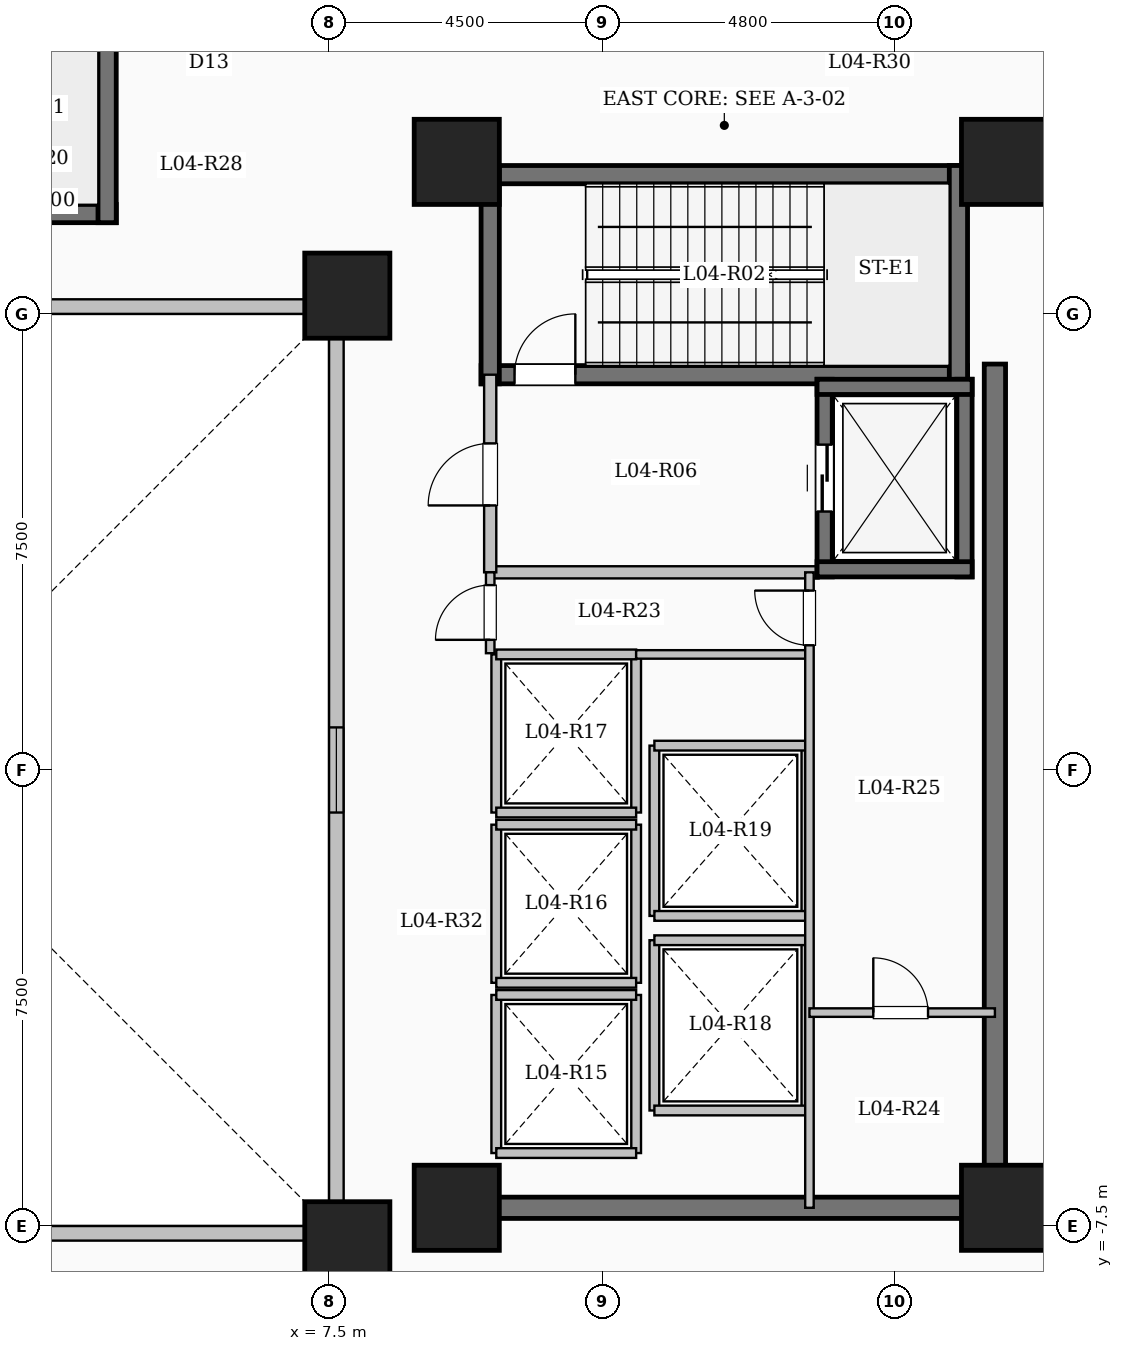
"""IFC4 building model, lengths in metres.
Left out: names, types, materials, properties, quantities, classifications, styles, units other than length and angle.
Written with IfcOpenShell. Run it as: python <this file> out.ifc"""

import sys

from ifc_helpers import new_model, si_unit, direction, frame, frame_2d, origin, origin_2d, place, context, subcontext, project, spatial, rectangle, extrude, element, fill, save


model = new_model("IFC4")
c1 = context("Model", 3, precision=1e-05, world=origin(), true_north=direction((0.0, 1.0)))
c2 = subcontext(c1, "Body", "Model", "MODEL_VIEW")
j1 = project(units=[si_unit("LENGTHUNIT", "METRE"), si_unit("PLANEANGLEUNIT", "RADIAN")], contexts=[c1])
p1 = place(None, origin())
s1 = spatial("IfcSite", under=j1, at=p1, CompositionType="ELEMENT")
p2 = place(p1, origin())
s2 = spatial("IfcBuilding", under=s1, at=p2, CompositionType="ELEMENT")
p3 = place(p2, frame((0.0, 0.0, 18.9)))
s3 = spatial("IfcBuildingStorey", under=s2, at=p3, CompositionType="ELEMENT", Elevation=18.9)
for number, where, z_axis, x_axis in (
    (1, (7.8, -7.8, 0.0), (0.0, 0.0, 1.0), (1.0, 0.0, 0.0)),
    (2, (7.8, 7.8, 0.0), (0.0, 0.0, 1.0), (1.0, 0.0, 0.0)),
    (3, (9.6, -7.2, 0.0), (0.0, 0.0, 1.0), (1.0, 0.0, 0.0)),
    (4, (9.6, 10.0, 0.0), (0.0, 0.0, 1.0), (1.0, 0.0, 0.0)),
    (5, (18.6, -7.2, 0.0), (0.0, 0.0, 1.0), (1.0, 0.0, 0.0)),
    (6, (18.6, 10.0, 0.0), (0.0, 0.0, 1.0), (1.0, 0.0, 0.0)),
):
    element("IfcColumn", number, at=place(p3, frame(where, z_axis=z_axis, x_axis=x_axis)), inside=s3, PredefinedType="COLUMN", context=c2, shape_type="SweptSolid", body=[
        extrude(rectangle(XDim=1.4, YDim=1.4, at=origin_2d()), origin(), (0.0, 0.0, 1.0), 5.1),
    ])
p4 = place(p3, frame((-7.62, -7.62, 0.0), z_axis=(0.0, 0.0, 1.0), x_axis=(1.0, 0.0, 0.0)))
e7 = element("IfcWall", 7, at=p4, inside=s3, PredefinedType="SOLIDWALL", context=c2, shape_type="SweptSolid", body=[
    extrude(rectangle(XDim=15.24, YDim=0.24, at=frame_2d((7.62, 0.0))), origin(), (0.0, 0.0, 1.0), 4.85),
])
p5 = place(p4, frame((6.92, 0.0, 0.95)))
e8 = element("IfcOpeningElement", 8, at=p5, cuts=e7, PredefinedType="OPENING", context=c2, shape_type="SweptSolid", body=[
    extrude(rectangle(XDim=1.4, YDim=1.5, at=frame_2d((0.7, 0.75))), frame((0.0, 0.13, 0.0), z_axis=(0.0, -1.0, 0.0), x_axis=(1.0, 0.0, 0.0)), (0.0, 0.0, 1.0), 0.26),
])
p6 = place(p3, frame((7.62, -7.62, 0.0), z_axis=(0.0, 0.0, 1.0), x_axis=(0.0, 1.0, 0.0)))
e9 = element("IfcWall", 9, at=p6, inside=s3, PredefinedType="SOLIDWALL", context=c2, shape_type="SweptSolid", body=[
    extrude(rectangle(XDim=15.24, YDim=0.24, at=frame_2d((7.62, 0.0))), origin(), (0.0, 0.0, 1.0), 4.85),
])
p7 = place(p6, frame((6.92, 0.0, 0.95)))
e10 = element("IfcOpeningElement", 10, at=p7, cuts=e9, PredefinedType="OPENING", context=c2, shape_type="SweptSolid", body=[
    extrude(rectangle(XDim=1.4, YDim=1.5, at=frame_2d((0.7, 0.75))), frame((0.0, 0.13, 0.0), z_axis=(0.0, -1.0, 0.0), x_axis=(1.0, 0.0, 0.0)), (0.0, 0.0, 1.0), 0.26),
])
p8 = place(p3, frame((7.62, 7.62, 0.0), z_axis=(0.0, 0.0, 1.0), x_axis=(-1.0, 0.0, 0.0)))
e11 = element("IfcWall", 11, at=p8, inside=s3, PredefinedType="SOLIDWALL", context=c2, shape_type="SweptSolid", body=[
    extrude(rectangle(XDim=15.24, YDim=0.24, at=frame_2d((7.62, 0.0))), origin(), (0.0, 0.0, 1.0), 4.85),
])
p9 = place(p8, frame((6.92, 0.0, 0.95)))
e12 = element("IfcOpeningElement", 12, at=p9, cuts=e11, PredefinedType="OPENING", context=c2, shape_type="SweptSolid", body=[
    extrude(rectangle(XDim=1.4, YDim=1.5, at=frame_2d((0.7, 0.75))), frame((0.0, 0.13, 0.0), z_axis=(0.0, -1.0, 0.0), x_axis=(1.0, 0.0, 0.0)), (0.0, 0.0, 1.0), 0.26),
])
p10 = place(p3, frame((10.0, 9.79, 0.0), z_axis=(0.0, 0.0, 1.0), x_axis=(1.0, 0.0, 0.0)))
e13 = element("IfcWall", 13, at=p10, inside=s3, PredefinedType="SHEAR", context=c2, shape_type="SweptSolid", body=[
    extrude(rectangle(XDim=8.0, YDim=0.3, at=frame_2d((4.0, 0.0))), origin(), (0.0, 0.0, 1.0), 5.1),
])
p11 = place(p3, frame((10.0, 6.5, 0.0), z_axis=(0.0, 0.0, 1.0), x_axis=(1.0, 0.0, 0.0)))
e14 = element("IfcWall", 14, at=p11, inside=s3, PredefinedType="SHEAR", context=c2, shape_type="SweptSolid", body=[
    extrude(rectangle(XDim=8.0, YDim=0.3, at=frame_2d((4.0, 0.0))), origin(), (0.0, 0.0, 1.0), 5.1),
])
p12 = place(p11, frame((0.55, 0.0, 0.0)))
e15 = element("IfcOpeningElement", 15, at=p12, cuts=e14, PredefinedType="OPENING", context=c2, shape_type="SweptSolid", body=[
    extrude(rectangle(XDim=1.0, YDim=2.15, at=frame_2d((0.5, 1.075))), frame((0.0, 0.16, 0.0), z_axis=(0.0, -1.0, 0.0), x_axis=(1.0, 0.0, 0.0)), (0.0, 0.0, 1.0), 0.32),
])
for number, where, z_axis, x_axis in (
    (16, (10.15, 6.35, 0.0), (0.0, 0.0, 1.0), (0.0, 1.0, 0.0)),
    (17, (17.85, 6.35, 0.0), (0.0, 0.0, 1.0), (0.0, 1.0, 0.0)),
):
    element("IfcWall", number, at=place(p3, frame(where, z_axis=z_axis, x_axis=x_axis)), inside=s3, PredefinedType="SHEAR", context=c2, shape_type="SweptSolid", body=[
        extrude(rectangle(XDim=3.59, YDim=0.3, at=frame_2d((1.795, 0.0))), origin(), (0.0, 0.0, 1.0), 5.1),
    ])
p13 = place(p3, frame((-4.0, 9.15, 0.0), z_axis=(0.0, 0.0, 1.0), x_axis=(1.0, 0.0, 0.0)))
e18 = element("IfcWall", 18, at=p13, inside=s3, PredefinedType="SHEAR", context=c2, shape_type="SweptSolid", body=[
    extrude(rectangle(XDim=8.0, YDim=0.3, at=frame_2d((4.0, 0.0))), origin(), (0.0, 0.0, 1.0), 5.1),
])
p14 = place(p13, frame((0.55, 0.0, 0.0)))
e19 = element("IfcOpeningElement", 19, at=p14, cuts=e18, PredefinedType="OPENING", context=c2, shape_type="SweptSolid", body=[
    extrude(rectangle(XDim=1.0, YDim=2.15, at=frame_2d((0.5, 1.075))), frame((0.0, 0.16, 0.0), z_axis=(0.0, -1.0, 0.0), x_axis=(1.0, 0.0, 0.0)), (0.0, 0.0, 1.0), 0.32),
])
p15 = place(p3, frame((3.85, 9.0, 0.0), z_axis=(0.0, 0.0, 1.0), x_axis=(0.0, 1.0, 0.0)))
e20 = element("IfcWall", 20, at=p15, inside=s3, PredefinedType="SHEAR", context=c2, shape_type="SweptSolid", body=[
    extrude(rectangle(XDim=3.59, YDim=0.3, at=frame_2d((1.795, 0.0))), origin(), (0.0, 0.0, 1.0), 5.1),
])
p16 = place(p3, frame((10.15, 3.25, 0.0), z_axis=(0.0, 0.0, 1.0), x_axis=(1.0, 0.0, 0.0)))
e21 = element("IfcWall", 21, at=p16, inside=s3, PredefinedType="SOLIDWALL", context=c2, shape_type="SweptSolid", body=[
    extrude(rectangle(XDim=5.4, YDim=0.2, at=frame_2d((2.7, 0.0))), origin(), (0.0, 0.0, 1.0), 4.85),
])
p17 = place(p3, frame((10.15, 3.25, 0.0), z_axis=(0.0, 0.0, 1.0), x_axis=(0.0, 1.0, 0.0)))
e22 = element("IfcWall", 22, at=p17, inside=s3, PredefinedType="SOLIDWALL", context=c2, shape_type="SweptSolid", body=[
    extrude(rectangle(XDim=3.25, YDim=0.2, at=frame_2d((1.625, 0.0))), origin(), (0.0, 0.0, 1.0), 4.85),
])
p18 = place(p17, frame((1.1, 0.0, 0.0)))
e23 = element("IfcOpeningElement", 23, at=p18, cuts=e22, PredefinedType="OPENING", context=c2, shape_type="SweptSolid", body=[
    extrude(rectangle(XDim=1.02, YDim=2.15, at=frame_2d((0.51, 1.075))), frame((0.0, 0.11, 0.0), z_axis=(0.0, -1.0, 0.0), x_axis=(1.0, 0.0, 0.0)), (0.0, 0.0, 1.0), 0.22),
])
p19 = place(p3, frame((15.65, 3.175, 0.0), z_axis=(0.0, 0.0, 1.0), x_axis=(0.0, 1.0, 0.0)))
e24 = element("IfcWall", 24, at=p19, inside=s3, PredefinedType="SHEAR", context=c2, shape_type="SweptSolid", body=[
    extrude(rectangle(XDim=3.25, YDim=0.25, at=frame_2d((1.625, 0.0))), origin(), (0.0, 0.0, 1.0), 5.1),
])
p20 = place(p19, frame((1.075, 0.0, 0.0)))
e25 = element("IfcOpeningElement", 25, at=p20, cuts=e24, PredefinedType="OPENING", context=c2, shape_type="SweptSolid", body=[
    extrude(rectangle(XDim=1.1, YDim=2.15, at=frame_2d((0.55, 1.075))), frame((0.0, 0.135, 0.0), z_axis=(0.0, -1.0, 0.0), x_axis=(1.0, 0.0, 0.0)), (0.0, 0.0, 1.0), 0.27),
])
p21 = place(p3, frame((17.95, 3.175, 0.0), z_axis=(0.0, 0.0, 1.0), x_axis=(0.0, 1.0, 0.0)))
e26 = element("IfcWall", 26, at=p21, inside=s3, PredefinedType="SHEAR", context=c2, shape_type="SweptSolid", body=[
    extrude(rectangle(XDim=3.25, YDim=0.25, at=frame_2d((1.625, 0.0))), origin(), (0.0, 0.0, 1.0), 5.1),
])
for number, where, z_axis, x_axis in (
    (27, (15.525, 3.3, 0.0), (0.0, 0.0, 1.0), (1.0, 0.0, 0.0)),
    (28, (15.525, 6.3, 0.0), (0.0, 0.0, 1.0), (1.0, 0.0, 0.0)),
):
    element("IfcWall", number, at=place(p3, frame(where, z_axis=z_axis, x_axis=x_axis)), inside=s3, PredefinedType="SHEAR", context=c2, shape_type="SweptSolid", body=[
        extrude(rectangle(XDim=2.55, YDim=0.25, at=frame_2d((1.275, 0.0))), origin(), (0.0, 0.0, 1.0), 5.1),
    ])
for number, where, z_axis, x_axis in (
    (29, (10.25, -6.3, 0.0), (0.0, 0.0, 1.0), (0.0, 1.0, 0.0)),
    (30, (12.55, -6.3, 0.0), (0.0, 0.0, 1.0), (0.0, 1.0, 0.0)),
):
    element("IfcWall", number, at=place(p3, frame(where, z_axis=z_axis, x_axis=x_axis)), inside=s3, PredefinedType="SOLIDWALL", context=c2, shape_type="SweptSolid", body=[
        extrude(rectangle(XDim=2.6, YDim=0.16, at=frame_2d((1.3, 0.0))), origin(), (0.0, 0.0, 1.0), 4.85),
    ])
for number, where, z_axis, x_axis in (
    (31, (10.25, -6.3, 0.0), (0.0, 0.0, 1.0), (1.0, 0.0, 0.0)),
    (32, (10.25, -3.7, 0.0), (0.0, 0.0, 1.0), (1.0, 0.0, 0.0)),
):
    element("IfcWall", number, at=place(p3, frame(where, z_axis=z_axis, x_axis=x_axis)), inside=s3, PredefinedType="SOLIDWALL", context=c2, shape_type="SweptSolid", body=[
        extrude(rectangle(XDim=2.3, YDim=0.16, at=frame_2d((1.15, 0.0))), origin(), (0.0, 0.0, 1.0), 4.85),
    ])
for number, where, z_axis, x_axis in (
    (33, (10.25, -3.5, 0.0), (0.0, 0.0, 1.0), (0.0, 1.0, 0.0)),
    (34, (12.55, -3.5, 0.0), (0.0, 0.0, 1.0), (0.0, 1.0, 0.0)),
):
    element("IfcWall", number, at=place(p3, frame(where, z_axis=z_axis, x_axis=x_axis)), inside=s3, PredefinedType="SOLIDWALL", context=c2, shape_type="SweptSolid", body=[
        extrude(rectangle(XDim=2.6, YDim=0.16, at=frame_2d((1.3, 0.0))), origin(), (0.0, 0.0, 1.0), 4.85),
    ])
for number, where, z_axis, x_axis in (
    (35, (10.25, -3.5, 0.0), (0.0, 0.0, 1.0), (1.0, 0.0, 0.0)),
    (36, (10.25, -0.9, 0.0), (0.0, 0.0, 1.0), (1.0, 0.0, 0.0)),
):
    element("IfcWall", number, at=place(p3, frame(where, z_axis=z_axis, x_axis=x_axis)), inside=s3, PredefinedType="SOLIDWALL", context=c2, shape_type="SweptSolid", body=[
        extrude(rectangle(XDim=2.3, YDim=0.16, at=frame_2d((1.15, 0.0))), origin(), (0.0, 0.0, 1.0), 4.85),
    ])
for number, where, z_axis, x_axis in (
    (37, (10.25, -0.7, 0.0), (0.0, 0.0, 1.0), (0.0, 1.0, 0.0)),
    (38, (12.55, -0.7, 0.0), (0.0, 0.0, 1.0), (0.0, 1.0, 0.0)),
):
    element("IfcWall", number, at=place(p3, frame(where, z_axis=z_axis, x_axis=x_axis)), inside=s3, PredefinedType="SOLIDWALL", context=c2, shape_type="SweptSolid", body=[
        extrude(rectangle(XDim=2.6, YDim=0.16, at=frame_2d((1.3, 0.0))), origin(), (0.0, 0.0, 1.0), 4.85),
    ])
for number, where, z_axis, x_axis in (
    (39, (10.25, -0.7, 0.0), (0.0, 0.0, 1.0), (1.0, 0.0, 0.0)),
    (40, (10.25, 1.9, 0.0), (0.0, 0.0, 1.0), (1.0, 0.0, 0.0)),
):
    element("IfcWall", number, at=place(p3, frame(where, z_axis=z_axis, x_axis=x_axis)), inside=s3, PredefinedType="SOLIDWALL", context=c2, shape_type="SweptSolid", body=[
        extrude(rectangle(XDim=2.3, YDim=0.16, at=frame_2d((1.15, 0.0))), origin(), (0.0, 0.0, 1.0), 4.85),
    ])
for number, where, z_axis, x_axis in (
    (41, (12.85, -5.6, 0.0), (0.0, 0.0, 1.0), (0.0, 1.0, 0.0)),
    (42, (15.35, -5.6, 0.0), (0.0, 0.0, 1.0), (0.0, 1.0, 0.0)),
):
    element("IfcWall", number, at=place(p3, frame(where, z_axis=z_axis, x_axis=x_axis)), inside=s3, PredefinedType="SOLIDWALL", context=c2, shape_type="SweptSolid", body=[
        extrude(rectangle(XDim=2.8, YDim=0.16, at=frame_2d((1.4, 0.0))), origin(), (0.0, 0.0, 1.0), 4.85),
    ])
for number, where, z_axis, x_axis in (
    (43, (12.85, -5.6, 0.0), (0.0, 0.0, 1.0), (1.0, 0.0, 0.0)),
    (44, (12.85, -2.8, 0.0), (0.0, 0.0, 1.0), (1.0, 0.0, 0.0)),
):
    element("IfcWall", number, at=place(p3, frame(where, z_axis=z_axis, x_axis=x_axis)), inside=s3, PredefinedType="SOLIDWALL", context=c2, shape_type="SweptSolid", body=[
        extrude(rectangle(XDim=2.5, YDim=0.16, at=frame_2d((1.25, 0.0))), origin(), (0.0, 0.0, 1.0), 4.85),
    ])
for number, where, z_axis, x_axis in (
    (45, (12.85, -2.4, 0.0), (0.0, 0.0, 1.0), (0.0, 1.0, 0.0)),
    (46, (15.35, -2.4, 0.0), (0.0, 0.0, 1.0), (0.0, 1.0, 0.0)),
):
    element("IfcWall", number, at=place(p3, frame(where, z_axis=z_axis, x_axis=x_axis)), inside=s3, PredefinedType="SOLIDWALL", context=c2, shape_type="SweptSolid", body=[
        extrude(rectangle(XDim=2.8, YDim=0.16, at=frame_2d((1.4, 0.0))), origin(), (0.0, 0.0, 1.0), 4.85),
    ])
for number, where, z_axis, x_axis in (
    (47, (12.85, -2.4, 0.0), (0.0, 0.0, 1.0), (1.0, 0.0, 0.0)),
    (48, (12.85, 0.4, 0.0), (0.0, 0.0, 1.0), (1.0, 0.0, 0.0)),
):
    element("IfcWall", number, at=place(p3, frame(where, z_axis=z_axis, x_axis=x_axis)), inside=s3, PredefinedType="SOLIDWALL", context=c2, shape_type="SweptSolid", body=[
        extrude(rectangle(XDim=2.5, YDim=0.16, at=frame_2d((1.25, 0.0))), origin(), (0.0, 0.0, 1.0), 4.85),
    ])
p22 = place(p3, frame((18.45, -7.375, 0.0), z_axis=(0.0, 0.0, 1.0), x_axis=(0.0, 1.0, 0.0)))
e49 = element("IfcWall", 49, at=p22, inside=s3, PredefinedType="SHEAR", context=c2, shape_type="SweptSolid", body=[
    extrude(rectangle(XDim=14.05, YDim=0.35, at=frame_2d((7.025, 0.0))), origin(), (0.0, 0.0, 1.0), 5.1),
])
p23 = place(p3, frame((10.075, -7.2, 0.0), z_axis=(0.0, 0.0, 1.0), x_axis=(1.0, 0.0, 0.0)))
e50 = element("IfcWall", 50, at=p23, inside=s3, PredefinedType="SHEAR", context=c2, shape_type="SweptSolid", body=[
    extrude(rectangle(XDim=8.55, YDim=0.35, at=frame_2d((4.275, 0.0))), origin(), (0.0, 0.0, 1.0), 5.1),
])
p24 = place(p3, frame((12.55, 1.9, 0.0), z_axis=(0.0, 0.0, 1.0), x_axis=(1.0, 0.0, 0.0)))
e51 = element("IfcWall", 51, at=p24, inside=s3, PredefinedType="PARTITIONING", context=c2, shape_type="SweptSolid", body=[
    extrude(rectangle(XDim=2.85, YDim=0.14, at=frame_2d((1.425, 0.0))), origin(), (0.0, 0.0, 1.0), 4.85),
])
p25 = place(p3, frame((10.15, 1.92, 0.0), z_axis=(0.0, 0.0, 1.0), x_axis=(0.0, 1.0, 0.0)))
e52 = element("IfcWall", 52, at=p25, inside=s3, PredefinedType="PARTITIONING", context=c2, shape_type="SweptSolid", body=[
    extrude(rectangle(XDim=1.33, YDim=0.14, at=frame_2d((0.665, 0.0))), origin(), (0.0, 0.0, 1.0), 4.85),
])
p26 = place(p25, frame((0.22, 0.0, 0.0)))
e53 = element("IfcOpeningElement", 53, at=p26, cuts=e52, PredefinedType="OPENING", context=c2, shape_type="SweptSolid", body=[
    extrude(rectangle(XDim=0.9, YDim=2.08, at=frame_2d((0.45, 1.04))), frame((0.0, 0.08, 0.0), z_axis=(0.0, -1.0, 0.0), x_axis=(1.0, 0.0, 0.0)), (0.0, 0.0, 1.0), 0.16),
])
p27 = place(p3, frame((15.4, -7.2, 0.0), z_axis=(0.0, 0.0, 1.0), x_axis=(0.0, 1.0, 0.0)))
e54 = element("IfcWall", 54, at=p27, inside=s3, PredefinedType="PARTITIONING", context=c2, shape_type="SweptSolid", body=[
    extrude(rectangle(XDim=10.45, YDim=0.14, at=frame_2d((5.225, 0.0))), origin(), (0.0, 0.0, 1.0), 4.85),
])
p28 = place(p27, frame((9.25, 0.0, 0.0)))
e55 = element("IfcOpeningElement", 55, at=p28, cuts=e54, PredefinedType="OPENING", context=c2, shape_type="SweptSolid", body=[
    extrude(rectangle(XDim=0.9, YDim=2.08, at=frame_2d((0.45, 1.04))), frame((0.0, 0.08, 0.0), z_axis=(0.0, -1.0, 0.0), x_axis=(1.0, 0.0, 0.0)), (0.0, 0.0, 1.0), 0.16),
])
p29 = place(p3, frame((15.4, -3.99, 0.0), z_axis=(0.0, 0.0, 1.0), x_axis=(1.0, 0.0, 0.0)))
e56 = element("IfcWall", 56, at=p29, inside=s3, PredefinedType="PARTITIONING", context=c2, shape_type="SweptSolid", body=[
    extrude(rectangle(XDim=3.05, YDim=0.14, at=frame_2d((1.525, 0.0))), origin(), (0.0, 0.0, 1.0), 4.85),
])
p30 = place(p29, frame((1.05, 0.0, 0.0)))
e57 = element("IfcOpeningElement", 57, at=p30, cuts=e56, PredefinedType="OPENING", context=c2, shape_type="SweptSolid", body=[
    extrude(rectangle(XDim=0.9, YDim=2.08, at=frame_2d((0.45, 1.04))), frame((0.0, 0.08, 0.0), z_axis=(0.0, -1.0, 0.0), x_axis=(1.0, 0.0, 0.0)), (0.0, 0.0, 1.0), 0.16),
])
p31 = place(p7, origin())
e58 = element("IfcWindow", 58, at=p31, inside=s3, PartitioningType="SINGLE_PANEL", PredefinedType="WINDOW", context=c2, shape_type="SweptSolid", body=[
    extrude(rectangle(XDim=1.4, YDim=1.5, at=frame_2d((0.7, 0.75))), frame((0.0, 0.03, 0.0), z_axis=(0.0, -1.0, 0.0), x_axis=(1.0, 0.0, 0.0)), (0.0, 0.0, 1.0), 0.06),
])
fill(e10, e58)
p32 = place(p12, origin())
e59 = element("IfcDoor", 59, at=p32, inside=s3, OperationType="SINGLE_SWING_RIGHT", PredefinedType="DOOR", context=c2, shape_type="SweptSolid", body=[
    extrude(rectangle(XDim=1.0, YDim=2.15, at=frame_2d((0.5, 1.075))), frame((0.0, 0.025, 0.0), z_axis=(0.0, -1.0, 0.0), x_axis=(1.0, 0.0, 0.0)), (0.0, 0.0, 1.0), 0.05),
])
fill(e15, e59)
p33 = place(p18, origin())
e60 = element("IfcDoor", 60, at=p33, inside=s3, OperationType="SINGLE_SWING_LEFT", PredefinedType="DOOR", context=c2, shape_type="SweptSolid", body=[
    extrude(rectangle(XDim=1.02, YDim=2.15, at=frame_2d((0.51, 1.075))), frame((0.0, 0.025, 0.0), z_axis=(0.0, -1.0, 0.0), x_axis=(1.0, 0.0, 0.0)), (0.0, 0.0, 1.0), 0.05),
])
fill(e23, e60)
p34 = place(p20, origin())
e61 = element("IfcDoor", 61, at=p34, inside=s3, OperationType="SLIDING_TO_LEFT", PredefinedType="DOOR", context=c2, shape_type="SweptSolid", body=[
    extrude(rectangle(XDim=1.1, YDim=2.15, at=frame_2d((0.55, 1.075))), frame((0.0, 0.025, 0.0), z_axis=(0.0, -1.0, 0.0), x_axis=(1.0, 0.0, 0.0)), (0.0, 0.0, 1.0), 0.05),
])
fill(e25, e61)
p35 = place(p26, origin())
e62 = element("IfcDoor", 62, at=p35, inside=s3, OperationType="SINGLE_SWING_LEFT", PredefinedType="DOOR", context=c2, shape_type="SweptSolid", body=[
    extrude(rectangle(XDim=0.9, YDim=2.08, at=frame_2d((0.45, 1.04))), frame((0.0, 0.025, 0.0), z_axis=(0.0, -1.0, 0.0), x_axis=(1.0, 0.0, 0.0)), (0.0, 0.0, 1.0), 0.05),
])
fill(e53, e62)
p36 = place(p28, origin())
e63 = element("IfcDoor", 63, at=p36, inside=s3, OperationType="SINGLE_SWING_RIGHT", PredefinedType="DOOR", context=c2, shape_type="SweptSolid", body=[
    extrude(rectangle(XDim=0.9, YDim=2.08, at=frame_2d((0.45, 1.04))), frame((0.0, 0.025, 0.0), z_axis=(0.0, -1.0, 0.0), x_axis=(1.0, 0.0, 0.0)), (0.0, 0.0, 1.0), 0.05),
])
fill(e55, e63)
p37 = place(p30, origin())
e64 = element("IfcDoor", 64, at=p37, inside=s3, OperationType="SINGLE_SWING_LEFT", PredefinedType="DOOR", context=c2, shape_type="SweptSolid", body=[
    extrude(rectangle(XDim=0.9, YDim=2.08, at=frame_2d((0.45, 1.04))), frame((0.0, 0.025, 0.0), z_axis=(0.0, -1.0, 0.0), x_axis=(1.0, 0.0, 0.0)), (0.0, 0.0, 1.0), 0.05),
])
fill(e57, e64)
save(model, sys.argv[1])
